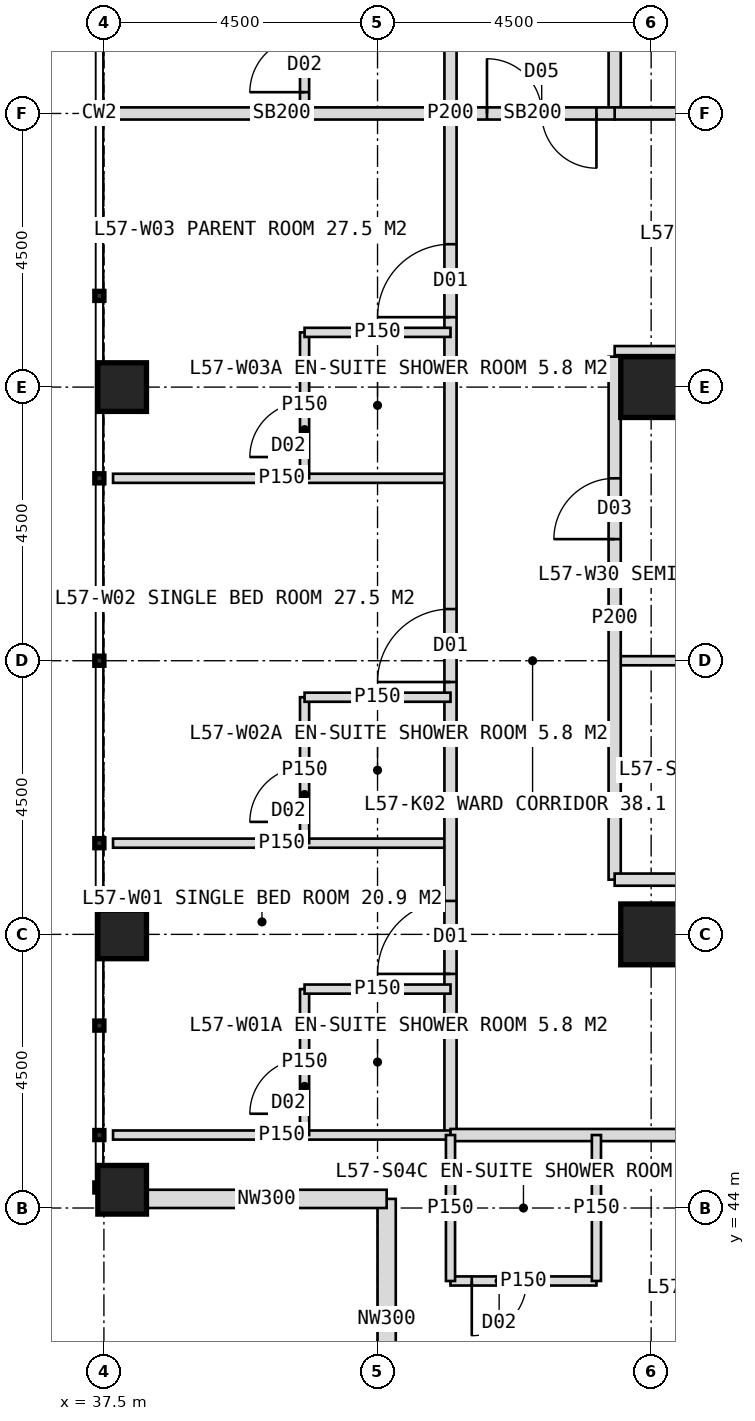
"""IFC4 building model, lengths in metres.
Left out: names, types, materials, properties, quantities, classifications, styles, units other than length and angle.
Written with IfcOpenShell. Run it as: python <this file> out.ifc"""

import sys

from ifc_helpers import new_model, si_unit, direction, frame, frame_2d, origin, origin_2d, place, context, subcontext, project, spatial, rectangle, hollow_rectangle, extrude, element, fill, save


model = new_model("IFC4")
c1 = context("Model", 3, precision=1e-05, world=origin(), true_north=direction((0.0, 1.0)))
c2 = subcontext(c1, "Body", "Model", "MODEL_VIEW")
j1 = project(units=[si_unit("LENGTHUNIT", "METRE"), si_unit("PLANEANGLEUNIT", "RADIAN")], contexts=[c1])
p1 = place(None, origin())
s1 = spatial("IfcSite", under=j1, at=p1, CompositionType="ELEMENT")
p2 = place(p1, origin())
s2 = spatial("IfcBuilding", under=s1, at=p2, CompositionType="ELEMENT")
p3 = place(p2, frame((0.0, 0.0, 237.0)))
s3 = spatial("IfcBuildingStorey", under=s2, at=p3, CompositionType="ELEMENT", Elevation=237.0)
for number, where, z_axis, x_axis in (
    (1, (46.5, 48.5, 0.0), (0.0, 0.0, 1.0), (1.0, 0.0, 0.0)),
    (2, (46.5, 57.5, 0.0), (0.0, 0.0, 1.0), (1.0, 0.0, 0.0)),
):
    element("IfcColumn", number, at=place(p3, frame(where, z_axis=z_axis, x_axis=x_axis)), inside=s3, PredefinedType="COLUMN", context=c2, shape_type="SweptSolid", body=[
        extrude(hollow_rectangle(XDim=1.0, YDim=1.0, WallThickness=0.1, at=origin_2d()), origin(), (0.0, 0.0, 1.0), 4.0),
    ])
for number, where, z_axis, x_axis in (
    (3, (37.8, 44.3, 0.0), (0.0, 0.0, 1.0), (1.0, 0.0, 0.0)),
    (4, (37.8, 48.5, 0.0), (0.0, 0.0, 1.0), (1.0, 0.0, 0.0)),
    (5, (37.8, 57.5, 0.0), (0.0, 0.0, 1.0), (1.0, 0.0, 0.0)),
):
    element("IfcColumn", number, at=place(p3, frame(where, z_axis=z_axis, x_axis=x_axis)), inside=s3, PredefinedType="COLUMN", context=c2, shape_type="SweptSolid", body=[
        extrude(hollow_rectangle(XDim=0.8, YDim=0.8, WallThickness=0.08, at=origin_2d()), origin(), (0.0, 0.0, 1.0), 4.0),
    ])
for number, where, z_axis, x_axis in (
    (6, (42.15, 40.2, 0.0), (0.0, 0.0, 1.0), (0.0, 1.0, 0.0)),
    (7, (42.15, 44.15, 0.0), (0.0, 0.0, 1.0), (-1.0, 0.0, 0.0)),
):
    element("IfcWall", number, at=place(p3, frame(where, z_axis=z_axis, x_axis=x_axis)), inside=s3, PredefinedType="ELEMENTEDWALL", context=c2, shape_type="SweptSolid", body=[
        extrude(rectangle(XDim=3.95, YDim=0.3, at=frame_2d((1.975, 0.0))), origin(), (0.0, 0.0, 1.0), 2.85),
    ])
for number, where, z_axis, x_axis in (
    (8, (43.2, 50.0, 0.0), (0.0, 0.0, 1.0), (-1.0, 0.0, 0.0)),
    (9, (43.2, 56.0, 0.0), (0.0, 0.0, 1.0), (-1.0, 0.0, 0.0)),
):
    element("IfcWall", number, at=place(p3, frame(where, z_axis=z_axis, x_axis=x_axis)), inside=s3, PredefinedType="PARTITIONING", context=c2, shape_type="SweptSolid", body=[
        extrude(rectangle(XDim=5.55, YDim=0.15, at=frame_2d((2.775, 0.0))), origin(), (0.0, 0.0, 1.0), 3.75),
    ])
p4 = place(p3, frame((43.2, 62.0, 0.0), z_axis=(0.0, 0.0, 1.0), x_axis=(-1.0, 0.0, 0.0)))
e10 = element("IfcWall", 10, at=p4, inside=s3, PredefinedType="SOLIDWALL", context=c2, shape_type="SweptSolid", body=[
    extrude(rectangle(XDim=5.55, YDim=0.2, at=frame_2d((2.775, 0.0))), origin(), (0.0, 0.0, 1.0), 2.95),
])
p5 = place(p3, frame((43.2, 45.2, 0.0), z_axis=(0.0, 0.0, 1.0), x_axis=(0.0, 1.0, 0.0)))
e11 = element("IfcWall", 11, at=p5, inside=s3, PredefinedType="PARTITIONING", context=c2, shape_type="SweptSolid", body=[
    extrude(rectangle(XDim=33.6, YDim=0.2, at=frame_2d((16.8, 0.0))), origin(), (0.0, 0.0, 1.0), 3.75),
])
p6 = place(p5, frame((2.65, 0.0, 0.0)))
e12 = element("IfcOpeningElement", 12, at=p6, cuts=e11, PredefinedType="OPENING", context=c2, shape_type="SweptSolid", body=[
    extrude(rectangle(XDim=1.2, YDim=2.2, at=frame_2d((0.6, 1.1))), frame((0.0, 0.11, 0.0), z_axis=(0.0, -1.0, 0.0), x_axis=(1.0, 0.0, 0.0)), (0.0, 0.0, 1.0), 0.22),
])
p7 = place(p5, frame((7.45, 0.0, 0.0)))
e13 = element("IfcOpeningElement", 13, at=p7, cuts=e11, PredefinedType="OPENING", context=c2, shape_type="SweptSolid", body=[
    extrude(rectangle(XDim=1.2, YDim=2.2, at=frame_2d((0.6, 1.1))), frame((0.0, 0.11, 0.0), z_axis=(0.0, -1.0, 0.0), x_axis=(1.0, 0.0, 0.0)), (0.0, 0.0, 1.0), 0.22),
])
p8 = place(p5, frame((13.45, 0.0, 0.0)))
e14 = element("IfcOpeningElement", 14, at=p8, cuts=e11, PredefinedType="OPENING", context=c2, shape_type="SweptSolid", body=[
    extrude(rectangle(XDim=1.2, YDim=2.2, at=frame_2d((0.6, 1.1))), frame((0.0, 0.11, 0.0), z_axis=(0.0, -1.0, 0.0), x_axis=(1.0, 0.0, 0.0)), (0.0, 0.0, 1.0), 0.22),
])
p9 = place(p5, frame((20.05, 0.0, 0.0)))
e15 = element("IfcOpeningElement", 15, at=p9, cuts=e11, PredefinedType="OPENING", context=c2, shape_type="SweptSolid", body=[
    extrude(rectangle(XDim=1.2, YDim=2.2, at=frame_2d((0.6, 1.1))), frame((0.0, 0.11, 0.0), z_axis=(0.0, -1.0, 0.0), x_axis=(1.0, 0.0, 0.0)), (0.0, 0.0, 1.0), 0.22),
])
p10 = place(p5, frame((29.05, 0.0, 0.0)))
e16 = element("IfcOpeningElement", 16, at=p10, cuts=e11, PredefinedType="OPENING", context=c2, shape_type="SweptSolid", body=[
    extrude(rectangle(XDim=1.2, YDim=2.2, at=frame_2d((0.6, 1.1))), frame((0.0, 0.11, 0.0), z_axis=(0.0, -1.0, 0.0), x_axis=(1.0, 0.0, 0.0)), (0.0, 0.0, 1.0), 0.22),
])
p11 = place(p3, frame((43.2, 45.2, 0.0), z_axis=(0.0, 0.0, 1.0), x_axis=(-1.0, 0.0, 0.0)))
e17 = element("IfcWall", 17, at=p11, inside=s3, PredefinedType="PARTITIONING", context=c2, shape_type="SweptSolid", body=[
    extrude(rectangle(XDim=5.55, YDim=0.15, at=frame_2d((2.775, 0.0))), origin(), (0.0, 0.0, 1.0), 3.75),
])
p12 = place(p3, frame((40.8, 45.2, 0.0), z_axis=(0.0, 0.0, 1.0), x_axis=(0.0, 1.0, 0.0)))
e18 = element("IfcWall", 18, at=p12, inside=s3, PredefinedType="PARTITIONING", context=c2, shape_type="SweptSolid", body=[
    extrude(rectangle(XDim=2.4, YDim=0.15, at=frame_2d((1.2, 0.0))), origin(), (0.0, 0.0, 1.0), 3.75),
])
p13 = place(p12, frame((0.35, 0.0, 0.0)))
e19 = element("IfcOpeningElement", 19, at=p13, cuts=e18, PredefinedType="OPENING", context=c2, shape_type="SweptSolid", body=[
    extrude(rectangle(XDim=0.9, YDim=2.1, at=frame_2d((0.45, 1.05))), frame((0.0, 0.085, 0.0), z_axis=(0.0, -1.0, 0.0), x_axis=(1.0, 0.0, 0.0)), (0.0, 0.0, 1.0), 0.17),
])
p14 = place(p3, frame((43.2, 47.6, 0.0), z_axis=(0.0, 0.0, 1.0), x_axis=(-1.0, 0.0, 0.0)))
e20 = element("IfcWall", 20, at=p14, inside=s3, PredefinedType="PARTITIONING", context=c2, shape_type="SweptSolid", body=[
    extrude(rectangle(XDim=2.4, YDim=0.15, at=frame_2d((1.2, 0.0))), origin(), (0.0, 0.0, 1.0), 3.75),
])
p15 = place(p3, frame((40.8, 50.0, 0.0), z_axis=(0.0, 0.0, 1.0), x_axis=(0.0, 1.0, 0.0)))
e21 = element("IfcWall", 21, at=p15, inside=s3, PredefinedType="PARTITIONING", context=c2, shape_type="SweptSolid", body=[
    extrude(rectangle(XDim=2.4, YDim=0.15, at=frame_2d((1.2, 0.0))), origin(), (0.0, 0.0, 1.0), 3.75),
])
p16 = place(p15, frame((0.35, 0.0, 0.0)))
e22 = element("IfcOpeningElement", 22, at=p16, cuts=e21, PredefinedType="OPENING", context=c2, shape_type="SweptSolid", body=[
    extrude(rectangle(XDim=0.9, YDim=2.1, at=frame_2d((0.45, 1.05))), frame((0.0, 0.085, 0.0), z_axis=(0.0, -1.0, 0.0), x_axis=(1.0, 0.0, 0.0)), (0.0, 0.0, 1.0), 0.17),
])
p17 = place(p3, frame((43.2, 52.4, 0.0), z_axis=(0.0, 0.0, 1.0), x_axis=(-1.0, 0.0, 0.0)))
e23 = element("IfcWall", 23, at=p17, inside=s3, PredefinedType="PARTITIONING", context=c2, shape_type="SweptSolid", body=[
    extrude(rectangle(XDim=2.4, YDim=0.15, at=frame_2d((1.2, 0.0))), origin(), (0.0, 0.0, 1.0), 3.75),
])
p18 = place(p3, frame((40.8, 56.0, 0.0), z_axis=(0.0, 0.0, 1.0), x_axis=(0.0, 1.0, 0.0)))
e24 = element("IfcWall", 24, at=p18, inside=s3, PredefinedType="PARTITIONING", context=c2, shape_type="SweptSolid", body=[
    extrude(rectangle(XDim=2.4, YDim=0.15, at=frame_2d((1.2, 0.0))), origin(), (0.0, 0.0, 1.0), 3.75),
])
p19 = place(p18, frame((0.35, 0.0, 0.0)))
e25 = element("IfcOpeningElement", 25, at=p19, cuts=e24, PredefinedType="OPENING", context=c2, shape_type="SweptSolid", body=[
    extrude(rectangle(XDim=0.9, YDim=2.1, at=frame_2d((0.45, 1.05))), frame((0.0, 0.085, 0.0), z_axis=(0.0, -1.0, 0.0), x_axis=(1.0, 0.0, 0.0)), (0.0, 0.0, 1.0), 0.17),
])
p20 = place(p3, frame((43.2, 58.4, 0.0), z_axis=(0.0, 0.0, 1.0), x_axis=(-1.0, 0.0, 0.0)))
e26 = element("IfcWall", 26, at=p20, inside=s3, PredefinedType="PARTITIONING", context=c2, shape_type="SweptSolid", body=[
    extrude(rectangle(XDim=2.4, YDim=0.15, at=frame_2d((1.2, 0.0))), origin(), (0.0, 0.0, 1.0), 3.75),
])
p21 = place(p3, frame((40.8, 62.0, 0.0), z_axis=(0.0, 0.0, 1.0), x_axis=(0.0, 1.0, 0.0)))
e27 = element("IfcWall", 27, at=p21, inside=s3, PredefinedType="PARTITIONING", context=c2, shape_type="SweptSolid", body=[
    extrude(rectangle(XDim=3.0, YDim=0.15, at=frame_2d((1.5, 0.0))), origin(), (0.0, 0.0, 1.0), 3.75),
])
p22 = place(p21, frame((0.35, 0.0, 0.0)))
e28 = element("IfcOpeningElement", 28, at=p22, cuts=e27, PredefinedType="OPENING", context=c2, shape_type="SweptSolid", body=[
    extrude(rectangle(XDim=0.9, YDim=2.1, at=frame_2d((0.45, 1.05))), frame((0.0, 0.085, 0.0), z_axis=(0.0, -1.0, 0.0), x_axis=(1.0, 0.0, 0.0)), (0.0, 0.0, 1.0), 0.17),
])
p23 = place(p3, frame((51.0, 53.0, 0.0), z_axis=(0.0, 0.0, 1.0), x_axis=(-1.0, 0.0, 0.0)))
e29 = element("IfcWall", 29, at=p23, inside=s3, PredefinedType="PARTITIONING", context=c2, shape_type="SweptSolid", body=[
    extrude(rectangle(XDim=5.1, YDim=0.15, at=frame_2d((2.55, 0.0))), origin(), (0.0, 0.0, 1.0), 3.75),
])
p24 = place(p3, frame((45.9, 49.4, 0.0), z_axis=(0.0, 0.0, 1.0), x_axis=(0.0, 1.0, 0.0)))
e30 = element("IfcWall", 30, at=p24, inside=s3, PredefinedType="PARTITIONING", context=c2, shape_type="SweptSolid", body=[
    extrude(rectangle(XDim=8.6, YDim=0.2, at=frame_2d((4.3, 0.0))), origin(), (0.0, 0.0, 1.0), 3.75),
])
p25 = place(p24, frame((5.6, 0.0, 0.0)))
e31 = element("IfcOpeningElement", 31, at=p25, cuts=e30, PredefinedType="OPENING", context=c2, shape_type="SweptSolid", body=[
    extrude(rectangle(XDim=1.0, YDim=2.1, at=frame_2d((0.5, 1.05))), frame((0.0, 0.11, 0.0), z_axis=(0.0, -1.0, 0.0), x_axis=(1.0, 0.0, 0.0)), (0.0, 0.0, 1.0), 0.22),
])
p26 = place(p3, frame((45.9, 62.0, 0.0), z_axis=(0.0, 0.0, 1.0), x_axis=(0.0, 1.0, 0.0)))
e32 = element("IfcWall", 32, at=p26, inside=s3, PredefinedType="PARTITIONING", context=c2, shape_type="SweptSolid", body=[
    extrude(rectangle(XDim=14.1, YDim=0.2, at=frame_2d((7.05, 0.0))), origin(), (0.0, 0.0, 1.0), 3.75),
])
p27 = place(p26, frame((2.5, 0.0, 0.0)))
e33 = element("IfcOpeningElement", 33, at=p27, cuts=e32, PredefinedType="OPENING", context=c2, shape_type="SweptSolid", body=[
    extrude(rectangle(XDim=1.0, YDim=2.1, at=frame_2d((0.5, 1.05))), frame((0.0, 0.11, 0.0), z_axis=(0.0, -1.0, 0.0), x_axis=(1.0, 0.0, 0.0)), (0.0, 0.0, 1.0), 0.22),
])
p28 = place(p26, frame((7.0, 0.0, 0.0)))
e34 = element("IfcOpeningElement", 34, at=p28, cuts=e32, PredefinedType="OPENING", context=c2, shape_type="SweptSolid", body=[
    extrude(rectangle(XDim=1.0, YDim=2.1, at=frame_2d((0.5, 1.05))), frame((0.0, 0.11, 0.0), z_axis=(0.0, -1.0, 0.0), x_axis=(1.0, 0.0, 0.0)), (0.0, 0.0, 1.0), 0.22),
])
p29 = place(p26, frame((11.05, 0.0, 0.0)))
e35 = element("IfcOpeningElement", 35, at=p29, cuts=e32, PredefinedType="OPENING", context=c2, shape_type="SweptSolid", body=[
    extrude(rectangle(XDim=1.0, YDim=2.1, at=frame_2d((0.5, 1.05))), frame((0.0, 0.11, 0.0), z_axis=(0.0, -1.0, 0.0), x_axis=(1.0, 0.0, 0.0)), (0.0, 0.0, 1.0), 0.22),
])
p30 = place(p3, frame((51.0, 58.1, 0.0), z_axis=(0.0, 0.0, 1.0), x_axis=(-1.0, 0.0, 0.0)))
e36 = element("IfcWall", 36, at=p30, inside=s3, PredefinedType="PARTITIONING", context=c2, shape_type="SweptSolid", body=[
    extrude(rectangle(XDim=5.1, YDim=0.15, at=frame_2d((2.55, 0.0))), origin(), (0.0, 0.0, 1.0), 3.75),
])
p31 = place(p30, frame((0.6, 0.0, 0.0)))
e37 = element("IfcOpeningElement", 37, at=p31, cuts=e36, PredefinedType="OPENING", context=c2, shape_type="SweptSolid", body=[
    extrude(rectangle(XDim=0.9, YDim=2.1, at=frame_2d((0.45, 1.05))), frame((0.0, 0.085, 0.0), z_axis=(0.0, -1.0, 0.0), x_axis=(1.0, 0.0, 0.0)), (0.0, 0.0, 1.0), 0.17),
])
p32 = place(p3, frame((51.0, 62.0, 0.0), z_axis=(0.0, 0.0, 1.0), x_axis=(-1.0, 0.0, 0.0)))
e38 = element("IfcWall", 38, at=p32, inside=s3, PredefinedType="SOLIDWALL", context=c2, shape_type="SweptSolid", body=[
    extrude(rectangle(XDim=5.1, YDim=0.2, at=frame_2d((2.55, 0.0))), origin(), (0.0, 0.0, 1.0), 2.95),
])
p33 = place(p3, frame((76.8, 45.2, 0.0), z_axis=(0.0, 0.0, 1.0), x_axis=(-1.0, 0.0, 0.0)))
e39 = element("IfcWall", 39, at=p33, inside=s3, PredefinedType="PARTITIONING", context=c2, shape_type="SweptSolid", body=[
    extrude(rectangle(XDim=33.6, YDim=0.2, at=frame_2d((16.8, 0.0))), origin(), (0.0, 0.0, 1.0), 3.75),
])
p34 = place(p33, frame((3.25, 0.0, 0.0)))
e40 = element("IfcOpeningElement", 40, at=p34, cuts=e39, PredefinedType="OPENING", context=c2, shape_type="SweptSolid", body=[
    extrude(rectangle(XDim=1.2, YDim=2.2, at=frame_2d((0.6, 1.1))), frame((0.0, 0.11, 0.0), z_axis=(0.0, -1.0, 0.0), x_axis=(1.0, 0.0, 0.0)), (0.0, 0.0, 1.0), 0.22),
])
p35 = place(p33, frame((11.05, 0.0, 0.0)))
e41 = element("IfcOpeningElement", 41, at=p35, cuts=e39, PredefinedType="OPENING", context=c2, shape_type="SweptSolid", body=[
    extrude(rectangle(XDim=1.2, YDim=2.2, at=frame_2d((0.6, 1.1))), frame((0.0, 0.11, 0.0), z_axis=(0.0, -1.0, 0.0), x_axis=(1.0, 0.0, 0.0)), (0.0, 0.0, 1.0), 0.22),
])
p36 = place(p33, frame((19.45, 0.0, 0.0)))
e42 = element("IfcOpeningElement", 42, at=p36, cuts=e39, PredefinedType="OPENING", context=c2, shape_type="SweptSolid", body=[
    extrude(rectangle(XDim=1.2, YDim=2.2, at=frame_2d((0.6, 1.1))), frame((0.0, 0.11, 0.0), z_axis=(0.0, -1.0, 0.0), x_axis=(1.0, 0.0, 0.0)), (0.0, 0.0, 1.0), 0.22),
])
p37 = place(p33, frame((25.45, 0.0, 0.0)))
e43 = element("IfcOpeningElement", 43, at=p37, cuts=e39, PredefinedType="OPENING", context=c2, shape_type="SweptSolid", body=[
    extrude(rectangle(XDim=1.2, YDim=2.2, at=frame_2d((0.6, 1.1))), frame((0.0, 0.11, 0.0), z_axis=(0.0, -1.0, 0.0), x_axis=(1.0, 0.0, 0.0)), (0.0, 0.0, 1.0), 0.22),
])
p38 = place(p3, frame((45.6, 42.8, 0.0), z_axis=(0.0, 0.0, 1.0), x_axis=(-1.0, 0.0, 0.0)))
e44 = element("IfcWall", 44, at=p38, inside=s3, PredefinedType="PARTITIONING", context=c2, shape_type="SweptSolid", body=[
    extrude(rectangle(XDim=2.4, YDim=0.15, at=frame_2d((1.2, 0.0))), origin(), (0.0, 0.0, 1.0), 3.75),
])
p39 = place(p38, frame((1.15, 0.0, 0.0)))
e45 = element("IfcOpeningElement", 45, at=p39, cuts=e44, PredefinedType="OPENING", context=c2, shape_type="SweptSolid", body=[
    extrude(rectangle(XDim=0.9, YDim=2.1, at=frame_2d((0.45, 1.05))), frame((0.0, 0.085, 0.0), z_axis=(0.0, -1.0, 0.0), x_axis=(1.0, 0.0, 0.0)), (0.0, 0.0, 1.0), 0.17),
])
for number, where, z_axis, x_axis in (
    (46, (45.6, 45.2, 0.0), (0.0, 0.0, 1.0), (0.0, -1.0, 0.0)),
    (47, (43.2, 45.2, 0.0), (0.0, 0.0, 1.0), (0.0, -1.0, 0.0)),
):
    element("IfcWall", number, at=place(p3, frame(where, z_axis=z_axis, x_axis=x_axis)), inside=s3, PredefinedType="PARTITIONING", context=c2, shape_type="SweptSolid", body=[
        extrude(rectangle(XDim=2.4, YDim=0.15, at=frame_2d((1.2, 0.0))), origin(), (0.0, 0.0, 1.0), 3.75),
    ])
p40 = place(p3, frame((57.75, 49.4, 0.0), z_axis=(0.0, 0.0, 1.0), x_axis=(-1.0, 0.0, 0.0)))
e48 = element("IfcWall", 48, at=p40, inside=s3, PredefinedType="PARTITIONING", context=c2, shape_type="SweptSolid", body=[
    extrude(rectangle(XDim=11.85, YDim=0.2, at=frame_2d((5.925, 0.0))), origin(), (0.0, 0.0, 1.0), 3.75),
])
p41 = place(p40, frame((0.325, 0.0, 0.0)))
e49 = element("IfcOpeningElement", 49, at=p41, cuts=e48, PredefinedType="OPENING", context=c2, shape_type="SweptSolid", body=[
    extrude(rectangle(XDim=1.0, YDim=2.1, at=frame_2d((0.5, 1.05))), frame((0.0, 0.11, 0.0), z_axis=(0.0, -1.0, 0.0), x_axis=(1.0, 0.0, 0.0)), (0.0, 0.0, 1.0), 0.22),
])
p42 = place(p40, frame((4.75, 0.0, 0.0)))
e50 = element("IfcOpeningElement", 50, at=p42, cuts=e48, PredefinedType="OPENING", context=c2, shape_type="SweptSolid", body=[
    extrude(rectangle(XDim=1.0, YDim=2.1, at=frame_2d((0.5, 1.05))), frame((0.0, 0.11, 0.0), z_axis=(0.0, -1.0, 0.0), x_axis=(1.0, 0.0, 0.0)), (0.0, 0.0, 1.0), 0.22),
])
p43 = place(p40, frame((8.8, 0.0, 0.0)))
e51 = element("IfcOpeningElement", 51, at=p43, cuts=e48, PredefinedType="OPENING", context=c2, shape_type="SweptSolid", body=[
    extrude(rectangle(XDim=1.0, YDim=2.1, at=frame_2d((0.5, 1.05))), frame((0.0, 0.11, 0.0), z_axis=(0.0, -1.0, 0.0), x_axis=(1.0, 0.0, 0.0)), (0.0, 0.0, 1.0), 0.22),
])
p44 = place(p3, frame((45.9, 62.0, 0.0), z_axis=(0.0, 0.0, 1.0), x_axis=(-1.0, 0.0, 0.0)))
e52 = element("IfcWall", 52, at=p44, inside=s3, PredefinedType="SOLIDWALL", context=c2, shape_type="SweptSolid", body=[
    extrude(rectangle(XDim=2.7, YDim=0.2, at=frame_2d((1.35, 0.0))), origin(), (0.0, 0.0, 1.0), 2.95),
])
p45 = place(p44, frame((0.3, 0.0, 0.0)))
e53 = element("IfcOpeningElement", 53, at=p45, cuts=e52, PredefinedType="OPENING", context=c2, shape_type="SweptSolid", body=[
    extrude(rectangle(XDim=1.8, YDim=2.2, at=frame_2d((0.9, 1.1))), frame((0.0, 0.11, 0.0), z_axis=(0.0, -1.0, 0.0), x_axis=(1.0, 0.0, 0.0)), (0.0, 0.0, 1.0), 0.22),
])
p46 = place(p6, origin())
e54 = element("IfcDoor", 54, at=p46, inside=s3, OperationType="SINGLE_SWING_LEFT", PredefinedType="DOOR", context=c2, shape_type="SweptSolid", body=[
    extrude(rectangle(XDim=1.2, YDim=2.2, at=frame_2d((0.6, 1.1))), frame((0.0, 0.025, 0.0), z_axis=(0.0, -1.0, 0.0), x_axis=(1.0, 0.0, 0.0)), (0.0, 0.0, 1.0), 0.05),
])
fill(e12, e54)
p47 = place(p13, origin())
e55 = element("IfcDoor", 55, at=p47, inside=s3, OperationType="SINGLE_SWING_LEFT", PredefinedType="DOOR", context=c2, shape_type="SweptSolid", body=[
    extrude(rectangle(XDim=0.9, YDim=2.1, at=frame_2d((0.45, 1.05))), frame((0.0, 0.025, 0.0), z_axis=(0.0, -1.0, 0.0), x_axis=(1.0, 0.0, 0.0)), (0.0, 0.0, 1.0), 0.05),
])
fill(e19, e55)
p48 = place(p7, origin())
e56 = element("IfcDoor", 56, at=p48, inside=s3, OperationType="SINGLE_SWING_LEFT", PredefinedType="DOOR", context=c2, shape_type="SweptSolid", body=[
    extrude(rectangle(XDim=1.2, YDim=2.2, at=frame_2d((0.6, 1.1))), frame((0.0, 0.025, 0.0), z_axis=(0.0, -1.0, 0.0), x_axis=(1.0, 0.0, 0.0)), (0.0, 0.0, 1.0), 0.05),
])
fill(e13, e56)
p49 = place(p16, origin())
e57 = element("IfcDoor", 57, at=p49, inside=s3, OperationType="SINGLE_SWING_LEFT", PredefinedType="DOOR", context=c2, shape_type="SweptSolid", body=[
    extrude(rectangle(XDim=0.9, YDim=2.1, at=frame_2d((0.45, 1.05))), frame((0.0, 0.025, 0.0), z_axis=(0.0, -1.0, 0.0), x_axis=(1.0, 0.0, 0.0)), (0.0, 0.0, 1.0), 0.05),
])
fill(e22, e57)
p50 = place(p8, origin())
e58 = element("IfcDoor", 58, at=p50, inside=s3, OperationType="SINGLE_SWING_LEFT", PredefinedType="DOOR", context=c2, shape_type="SweptSolid", body=[
    extrude(rectangle(XDim=1.2, YDim=2.2, at=frame_2d((0.6, 1.1))), frame((0.0, 0.025, 0.0), z_axis=(0.0, -1.0, 0.0), x_axis=(1.0, 0.0, 0.0)), (0.0, 0.0, 1.0), 0.05),
])
fill(e14, e58)
p51 = place(p19, origin())
e59 = element("IfcDoor", 59, at=p51, inside=s3, OperationType="SINGLE_SWING_LEFT", PredefinedType="DOOR", context=c2, shape_type="SweptSolid", body=[
    extrude(rectangle(XDim=0.9, YDim=2.1, at=frame_2d((0.45, 1.05))), frame((0.0, 0.025, 0.0), z_axis=(0.0, -1.0, 0.0), x_axis=(1.0, 0.0, 0.0)), (0.0, 0.0, 1.0), 0.05),
])
fill(e25, e59)
p52 = place(p22, origin())
e60 = element("IfcDoor", 60, at=p52, inside=s3, OperationType="SINGLE_SWING_LEFT", PredefinedType="DOOR", context=c2, shape_type="SweptSolid", body=[
    extrude(rectangle(XDim=0.9, YDim=2.1, at=frame_2d((0.45, 1.05))), frame((0.0, 0.025, 0.0), z_axis=(0.0, -1.0, 0.0), x_axis=(1.0, 0.0, 0.0)), (0.0, 0.0, 1.0), 0.05),
])
fill(e28, e60)
p53 = place(p25, origin())
e61 = element("IfcDoor", 61, at=p53, inside=s3, OperationType="SINGLE_SWING_LEFT", PredefinedType="DOOR", context=c2, shape_type="SweptSolid", body=[
    extrude(rectangle(XDim=1.0, YDim=2.1, at=frame_2d((0.5, 1.05))), frame((0.0, 0.025, 0.0), z_axis=(0.0, -1.0, 0.0), x_axis=(1.0, 0.0, 0.0)), (0.0, 0.0, 1.0), 0.05),
])
fill(e31, e61)
p54 = place(p39, origin())
e62 = element("IfcDoor", 62, at=p54, inside=s3, OperationType="SINGLE_SWING_RIGHT", PredefinedType="DOOR", context=c2, shape_type="SweptSolid", body=[
    extrude(rectangle(XDim=0.9, YDim=2.1, at=frame_2d((0.45, 1.05))), frame((0.0, 0.025, 0.0), z_axis=(0.0, -1.0, 0.0), x_axis=(1.0, 0.0, 0.0)), (0.0, 0.0, 1.0), 0.05),
])
fill(e45, e62)
p55 = place(p45, origin())
e63 = element("IfcDoor", 63, at=p55, inside=s3, OperationType="DOUBLE_DOOR_DOUBLE_SWING", PredefinedType="DOOR", context=c2, shape_type="SweptSolid", body=[
    extrude(rectangle(XDim=1.8, YDim=2.2, at=frame_2d((0.9, 1.1))), frame((0.0, 0.025, 0.0), z_axis=(0.0, -1.0, 0.0), x_axis=(1.0, 0.0, 0.0)), (0.0, 0.0, 1.0), 0.05),
])
fill(e53, e63)
save(model, sys.argv[1])
